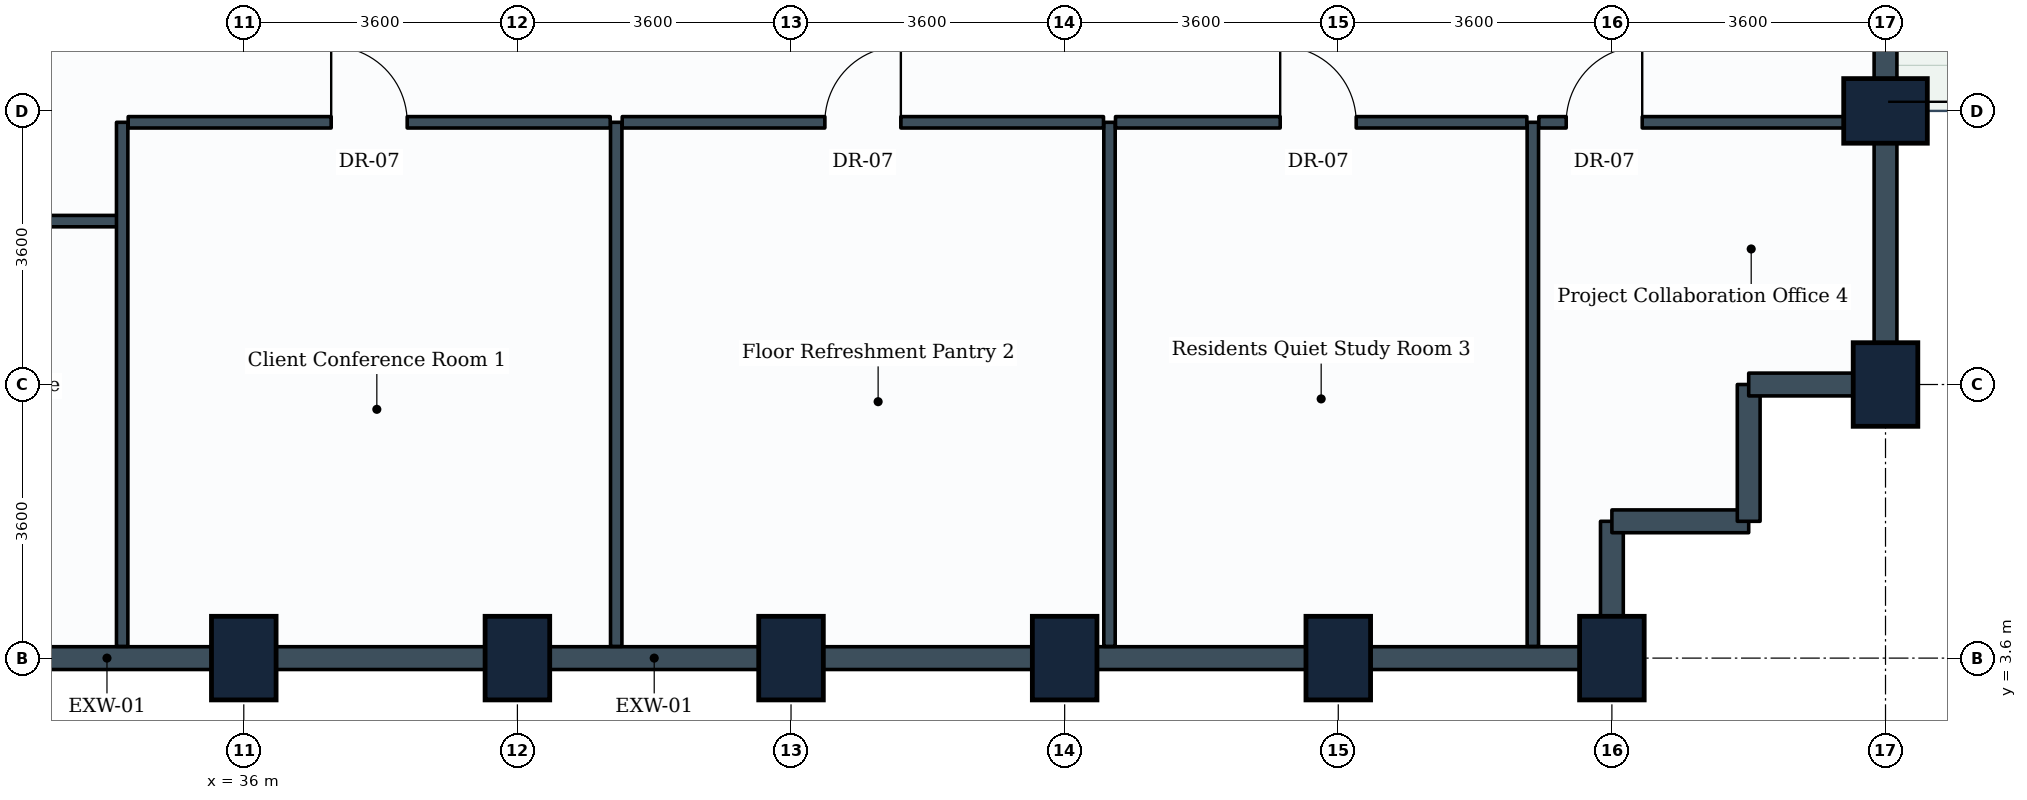
"""IFC4 building model, lengths in metres.
Left out: names, types, materials, properties, quantities, classifications, styles, units other than length and angle.
Written with IfcOpenShell. Run it as: python <this file> out.ifc"""

import sys

from ifc_helpers import new_model, si_unit, direction, frame, frame_2d, origin, origin_2d, place, context, subcontext, project, spatial, rectangle, extrude, element, fill, save


model = new_model("IFC4")
c1 = context("Model", 3, precision=1e-05, world=origin(), true_north=direction((0.0, 1.0)))
c2 = subcontext(c1, "Body", "Model", "MODEL_VIEW")
j1 = project(units=[si_unit("LENGTHUNIT", "METRE"), si_unit("PLANEANGLEUNIT", "RADIAN")], contexts=[c1])
p1 = place(None, origin())
s1 = spatial("IfcSite", under=j1, at=p1, CompositionType="ELEMENT")
p2 = place(p1, origin())
s2 = spatial("IfcBuilding", under=s1, at=p2, CompositionType="ELEMENT")
p3 = place(p2, frame((0.0, 0.0, 84.0)))
s3 = spatial("IfcBuildingStorey", under=s2, at=p3, CompositionType="ELEMENT", Elevation=84.0)
for number, where, z_axis, x_axis in (
    (1, (36.0, 3.6, 0.0), (0.0, 0.0, 1.0), (1.0, 0.0, 0.0)),
    (2, (39.6, 3.6, 0.0), (0.0, 0.0, 1.0), (1.0, 0.0, 0.0)),
    (3, (43.2, 3.6, 0.0), (0.0, 0.0, 1.0), (1.0, 0.0, 0.0)),
    (4, (46.8, 3.6, 0.0), (0.0, 0.0, 1.0), (1.0, 0.0, 0.0)),
    (5, (50.4, 3.6, 0.0), (0.0, 0.0, 1.0), (1.0, 0.0, 0.0)),
    (6, (54.0, 3.6, 0.0), (0.0, 0.0, 1.0), (1.0, 0.0, 0.0)),
    (7, (57.6, 7.2, 0.0), (0.0, 0.0, 1.0), (1.0, 0.0, 0.0)),
    (8, (57.6, 10.8, 0.0), (0.0, 0.0, 1.0), (0.0, 1.0, 0.0)),
):
    element("IfcColumn", number, at=place(p3, frame(where, z_axis=z_axis, x_axis=x_axis)), inside=s3, PredefinedType="COLUMN", context=c2, shape_type="SweptSolid", body=[
        extrude(rectangle(XDim=0.85, YDim=1.1, at=origin_2d()), origin(), (0.0, 0.0, 1.0), 3.9),
    ])
for number, where, z_axis, x_axis in (
    (9, (36.0, 3.6, 0.0), (0.0, 0.0, 1.0), (-1.0, 0.0, 0.0)),
    (10, (39.6, 3.6, 0.0), (0.0, 0.0, 1.0), (-1.0, 0.0, 0.0)),
):
    element("IfcWall", number, at=place(p3, frame(where, z_axis=z_axis, x_axis=x_axis)), inside=s3, PredefinedType="STANDARD", context=c2, shape_type="SweptSolid", body=[
        extrude(rectangle(XDim=3.6, YDim=0.3, at=frame_2d((1.8, 0.0))), origin(), (0.0, 0.0, 1.0), 2.93),
    ])
p4 = place(p3, frame((43.2, 3.6, 0.0), z_axis=(0.0, 0.0, 1.0), x_axis=(-1.0, 0.0, 0.0)))
e11 = element("IfcWall", 11, at=p4, inside=s3, PredefinedType="STANDARD", context=c2, shape_type="SweptSolid", body=[
    extrude(rectangle(XDim=3.6, YDim=0.3, at=frame_2d((1.8, 0.0))), origin(), (0.0, 0.0, 1.0), 2.93),
])
p5 = place(p3, frame((46.8, 3.6, 0.0), z_axis=(0.0, 0.0, 1.0), x_axis=(-1.0, 0.0, 0.0)))
e12 = element("IfcWall", 12, at=p5, inside=s3, PredefinedType="STANDARD", context=c2, shape_type="SweptSolid", body=[
    extrude(rectangle(XDim=3.6, YDim=0.3, at=frame_2d((1.8, 0.0))), origin(), (0.0, 0.0, 1.0), 2.93),
])
p6 = place(p3, frame((50.4, 3.6, 0.0), z_axis=(0.0, 0.0, 1.0), x_axis=(-1.0, 0.0, 0.0)))
e13 = element("IfcWall", 13, at=p6, inside=s3, PredefinedType="STANDARD", context=c2, shape_type="SweptSolid", body=[
    extrude(rectangle(XDim=3.6, YDim=0.3, at=frame_2d((1.8, 0.0))), origin(), (0.0, 0.0, 1.0), 2.93),
])
p7 = place(p3, frame((54.0, 3.6, 0.0), z_axis=(0.0, 0.0, 1.0), x_axis=(-1.0, 0.0, 0.0)))
e14 = element("IfcWall", 14, at=p7, inside=s3, PredefinedType="STANDARD", context=c2, shape_type="SweptSolid", body=[
    extrude(rectangle(XDim=3.6, YDim=0.3, at=frame_2d((1.8, 0.0))), origin(), (0.0, 0.0, 1.0), 2.93),
])
p8 = place(p3, frame((54.0, 5.4, 0.0), z_axis=(0.0, 0.0, 1.0), x_axis=(0.0, -1.0, 0.0)))
e15 = element("IfcWall", 15, at=p8, inside=s3, PredefinedType="STANDARD", context=c2, shape_type="SweptSolid", body=[
    extrude(rectangle(XDim=1.8, YDim=0.3, at=frame_2d((0.9, 0.0))), origin(), (0.0, 0.0, 1.0), 2.93),
])
for number, where, z_axis, x_axis in (
    (16, (55.8, 5.4, 0.0), (0.0, 0.0, 1.0), (-1.0, 0.0, 0.0)),
    (17, (55.8, 7.2, 0.0), (0.0, 0.0, 1.0), (0.0, -1.0, 0.0)),
):
    element("IfcWall", number, at=place(p3, frame(where, z_axis=z_axis, x_axis=x_axis)), inside=s3, PredefinedType="STANDARD", context=c2, shape_type="SweptSolid", body=[
        extrude(rectangle(XDim=1.8, YDim=0.3, at=frame_2d((0.9, 0.0))), origin(), (0.0, 0.0, 1.0), 3.635),
    ])
p9 = place(p3, frame((57.6, 7.2, 0.0), z_axis=(0.0, 0.0, 1.0), x_axis=(-1.0, 0.0, 0.0)))
e18 = element("IfcWall", 18, at=p9, inside=s3, PredefinedType="STANDARD", context=c2, shape_type="SweptSolid", body=[
    extrude(rectangle(XDim=1.8, YDim=0.3, at=frame_2d((0.9, 0.0))), origin(), (0.0, 0.0, 1.0), 2.93),
])
p10 = place(p3, frame((57.6, 10.8, 0.0), z_axis=(0.0, 0.0, 1.0), x_axis=(0.0, -1.0, 0.0)))
e19 = element("IfcWall", 19, at=p10, inside=s3, PredefinedType="STANDARD", context=c2, shape_type="SweptSolid", body=[
    extrude(rectangle(XDim=3.6, YDim=0.3, at=frame_2d((1.8, 0.0))), origin(), (0.0, 0.0, 1.0), 2.93),
])
p11 = place(p3, frame((57.6, 14.4, 0.0), z_axis=(0.0, 0.0, 1.0), x_axis=(0.0, -1.0, 0.0)))
e20 = element("IfcWall", 20, at=p11, inside=s3, PredefinedType="STANDARD", context=c2, shape_type="SweptSolid", body=[
    extrude(rectangle(XDim=3.6, YDim=0.3, at=frame_2d((1.8, 0.0))), origin(), (0.0, 0.0, 1.0), 2.93),
])
p12 = place(p3, frame((28.879, 9.35, 0.0), z_axis=(0.0, 0.0, 1.0), x_axis=(1.0, 0.0, 0.0)))
e21 = element("IfcWall", 21, at=p12, inside=s3, PredefinedType="PARTITIONING", context=c2, shape_type="SweptSolid", body=[
    extrude(rectangle(XDim=5.521, YDim=0.15, at=frame_2d((2.76, 0.0))), origin(), (0.0, 0.0, 1.0), 3.635),
])
p13 = place(p12, frame((0.36, 0.0, 0.0)))
e22 = element("IfcOpeningElement", 22, at=p13, cuts=e21, PredefinedType="OPENING", context=c2, shape_type="SweptSolid", body=[
    extrude(rectangle(XDim=1.0, YDim=2.1, at=frame_2d((0.5, 1.05))), frame((0.0, 0.085, 0.0), z_axis=(0.0, -1.0, 0.0), x_axis=(1.0, 0.0, 0.0)), (0.0, 0.0, 1.0), 0.17),
])
for number, where, z_axis, x_axis in (
    (23, (34.4, 3.754, 0.0), (0.0, 0.0, 1.0), (0.0, 1.0, 0.0)),
    (24, (40.9, 3.754, 0.0), (0.0, 0.0, 1.0), (0.0, 1.0, 0.0)),
):
    element("IfcWall", number, at=place(p3, frame(where, z_axis=z_axis, x_axis=x_axis)), inside=s3, PredefinedType="PARTITIONING", context=c2, shape_type="SweptSolid", body=[
        extrude(rectangle(XDim=6.896, YDim=0.15, at=frame_2d((3.448, 0.0))), origin(), (0.0, 0.0, 1.0), 2.93),
    ])
p14 = place(p3, frame((34.479, 10.65, 0.0), z_axis=(0.0, 0.0, 1.0), x_axis=(1.0, 0.0, 0.0)))
e25 = element("IfcWall", 25, at=p14, inside=s3, PredefinedType="PARTITIONING", context=c2, shape_type="SweptSolid", body=[
    extrude(rectangle(XDim=6.342, YDim=0.15, at=frame_2d((3.171, 0.0))), origin(), (0.0, 0.0, 1.0), 3.18),
])
p15 = place(p14, frame((2.671, 0.0, 0.0)))
e26 = element("IfcOpeningElement", 26, at=p15, cuts=e25, PredefinedType="OPENING", context=c2, shape_type="SweptSolid", body=[
    extrude(rectangle(XDim=1.0, YDim=2.1, at=frame_2d((0.5, 1.05))), frame((0.0, 0.085, 0.0), z_axis=(0.0, -1.0, 0.0), x_axis=(1.0, 0.0, 0.0)), (0.0, 0.0, 1.0), 0.17),
])
p16 = place(p3, frame((47.39, 3.754, 0.0), z_axis=(0.0, 0.0, 1.0), x_axis=(0.0, 1.0, 0.0)))
e27 = element("IfcWall", 27, at=p16, inside=s3, PredefinedType="PARTITIONING", context=c2, shape_type="SweptSolid", body=[
    extrude(rectangle(XDim=6.896, YDim=0.15, at=frame_2d((3.448, 0.0))), origin(), (0.0, 0.0, 1.0), 2.93),
])
p17 = place(p3, frame((40.979, 10.65, 0.0), z_axis=(0.0, 0.0, 1.0), x_axis=(1.0, 0.0, 0.0)))
e28 = element("IfcWall", 28, at=p17, inside=s3, PredefinedType="PARTITIONING", context=c2, shape_type="SweptSolid", body=[
    extrude(rectangle(XDim=6.332, YDim=0.15, at=frame_2d((3.166, 0.0))), origin(), (0.0, 0.0, 1.0), 3.18),
])
p18 = place(p17, frame((2.666, 0.0, 0.0)))
e29 = element("IfcOpeningElement", 29, at=p18, cuts=e28, PredefinedType="OPENING", context=c2, shape_type="SweptSolid", body=[
    extrude(rectangle(XDim=1.0, YDim=2.1, at=frame_2d((0.5, 1.05))), frame((0.0, 0.085, 0.0), z_axis=(0.0, -1.0, 0.0), x_axis=(1.0, 0.0, 0.0)), (0.0, 0.0, 1.0), 0.17),
])
p19 = place(p3, frame((52.96, 3.754, 0.0), z_axis=(0.0, 0.0, 1.0), x_axis=(0.0, 1.0, 0.0)))
e30 = element("IfcWall", 30, at=p19, inside=s3, PredefinedType="PARTITIONING", context=c2, shape_type="SweptSolid", body=[
    extrude(rectangle(XDim=6.896, YDim=0.15, at=frame_2d((3.448, 0.0))), origin(), (0.0, 0.0, 1.0), 2.93),
])
p20 = place(p3, frame((47.469, 10.65, 0.0), z_axis=(0.0, 0.0, 1.0), x_axis=(1.0, 0.0, 0.0)))
e31 = element("IfcWall", 31, at=p20, inside=s3, PredefinedType="PARTITIONING", context=c2, shape_type="SweptSolid", body=[
    extrude(rectangle(XDim=5.412, YDim=0.15, at=frame_2d((2.706, 0.0))), origin(), (0.0, 0.0, 1.0), 3.23),
])
p21 = place(p20, frame((2.167, 0.0, 0.0)))
e32 = element("IfcOpeningElement", 32, at=p21, cuts=e31, PredefinedType="OPENING", context=c2, shape_type="SweptSolid", body=[
    extrude(rectangle(XDim=1.0, YDim=2.1, at=frame_2d((0.5, 1.05))), frame((0.0, 0.085, 0.0), z_axis=(0.0, -1.0, 0.0), x_axis=(1.0, 0.0, 0.0)), (0.0, 0.0, 1.0), 0.17),
])
p22 = place(p3, frame((53.039, 10.65, 0.0), z_axis=(0.0, 0.0, 1.0), x_axis=(1.0, 0.0, 0.0)))
e33 = element("IfcWall", 33, at=p22, inside=s3, PredefinedType="PARTITIONING", context=c2, shape_type="SweptSolid", body=[
    extrude(rectangle(XDim=4.407, YDim=0.15, at=frame_2d((2.204, 0.0))), origin(), (0.0, 0.0, 1.0), 2.93),
])
p23 = place(p22, frame((0.36, 0.0, 0.0)))
e34 = element("IfcOpeningElement", 34, at=p23, cuts=e33, PredefinedType="OPENING", context=c2, shape_type="SweptSolid", body=[
    extrude(rectangle(XDim=1.0, YDim=2.1, at=frame_2d((0.5, 1.05))), frame((0.0, 0.085, 0.0), z_axis=(0.0, -1.0, 0.0), x_axis=(1.0, 0.0, 0.0)), (0.0, 0.0, 1.0), 0.17),
])
p24 = place(p15, origin())
e35 = element("IfcDoor", 35, at=p24, inside=s3, OperationType="SINGLE_SWING_LEFT", PredefinedType="DOOR", context=c2, shape_type="SweptSolid", body=[
    extrude(rectangle(XDim=1.0, YDim=2.1, at=frame_2d((0.5, 1.05))), frame((0.0, 0.025, 0.0), z_axis=(0.0, -1.0, 0.0), x_axis=(1.0, 0.0, 0.0)), (0.0, 0.0, 1.0), 0.05),
])
fill(e26, e35)
p25 = place(p18, origin())
e36 = element("IfcDoor", 36, at=p25, inside=s3, OperationType="SINGLE_SWING_RIGHT", PredefinedType="DOOR", context=c2, shape_type="SweptSolid", body=[
    extrude(rectangle(XDim=1.0, YDim=2.1, at=frame_2d((0.5, 1.05))), frame((0.0, 0.025, 0.0), z_axis=(0.0, -1.0, 0.0), x_axis=(1.0, 0.0, 0.0)), (0.0, 0.0, 1.0), 0.05),
])
fill(e29, e36)
p26 = place(p21, origin())
e37 = element("IfcDoor", 37, at=p26, inside=s3, OperationType="SINGLE_SWING_LEFT", PredefinedType="DOOR", context=c2, shape_type="SweptSolid", body=[
    extrude(rectangle(XDim=1.0, YDim=2.1, at=frame_2d((0.5, 1.05))), frame((0.0, 0.025, 0.0), z_axis=(0.0, -1.0, 0.0), x_axis=(1.0, 0.0, 0.0)), (0.0, 0.0, 1.0), 0.05),
])
fill(e32, e37)
p27 = place(p23, origin())
e38 = element("IfcDoor", 38, at=p27, inside=s3, OperationType="SINGLE_SWING_RIGHT", PredefinedType="DOOR", context=c2, shape_type="SweptSolid", body=[
    extrude(rectangle(XDim=1.0, YDim=2.1, at=frame_2d((0.5, 1.05))), frame((0.0, 0.025, 0.0), z_axis=(0.0, -1.0, 0.0), x_axis=(1.0, 0.0, 0.0)), (0.0, 0.0, 1.0), 0.05),
])
fill(e34, e38)
save(model, sys.argv[1])
